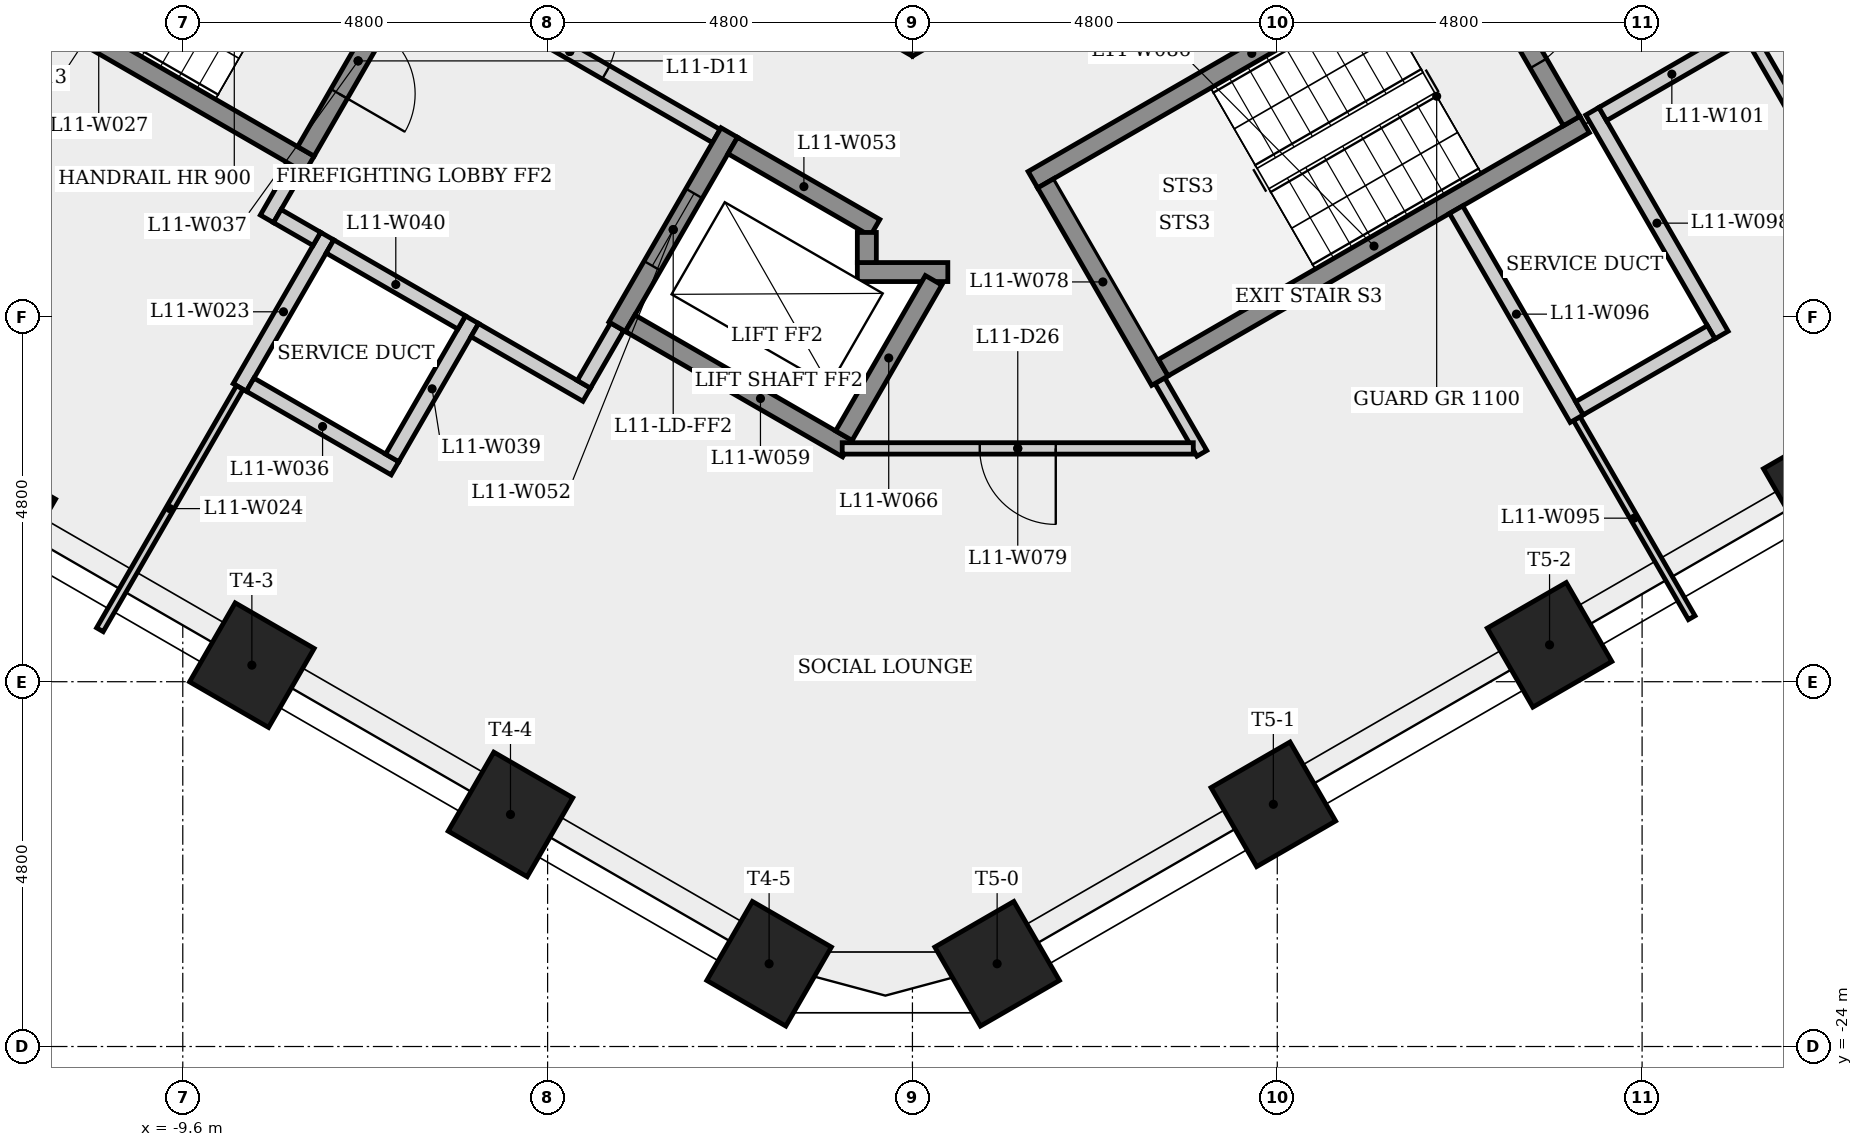
"""IFC4 building model, lengths in metres.
Left out: names, types, materials, properties, quantities, classifications, styles, units other than length and angle.
Written with IfcOpenShell. Run it as: python <this file> out.ifc"""

import sys

from ifc_helpers import new_model, si_unit, direction, frame, frame_2d, origin, origin_2d, place, context, subcontext, project, spatial, rectangle, extrude, element, fill, save


model = new_model("IFC4")
c1 = context("Model", 3, precision=1e-05, world=origin(), true_north=direction((0.0, 1.0)))
c2 = subcontext(c1, "Body", "Model", "MODEL_VIEW")
j1 = project(units=[si_unit("LENGTHUNIT", "METRE"), si_unit("PLANEANGLEUNIT", "RADIAN")], contexts=[c1])
p1 = place(None, origin())
s1 = spatial("IfcSite", under=j1, at=p1, CompositionType="ELEMENT")
p2 = place(p1, origin())
s2 = spatial("IfcBuilding", under=s1, at=p2, CompositionType="ELEMENT")
p3 = place(p2, frame((0.0, 0.0, 45.9)))
s3 = spatial("IfcBuildingStorey", under=s2, at=p3, CompositionType="ELEMENT", Elevation=45.9)
p4 = place(p3, frame((-9.3, -5.138, 0.0), z_axis=(0.0, 0.0, 1.0), x_axis=(0.866023993627, -0.500002442456, 0.0)))
e1 = element("IfcWall", 1, at=p4, inside=s3, PredefinedType="SHEAR", context=c2, shape_type="SweptSolid", body=[
    extrude(rectangle(XDim=10.97, YDim=0.8, at=frame_2d((5.485, 0.0))), origin(), (0.0, 0.0, 1.0), 3.4),
])
p5 = place(p4, frame((2.268, 0.0, 0.0)))
e2 = element("IfcOpeningElement", 2, at=p5, cuts=e1, PredefinedType="OPENING", context=c2, shape_type="SweptSolid", body=[
    extrude(rectangle(XDim=0.9, YDim=2.1, at=frame_2d((0.45, 1.05))), frame((0.0, 0.41, 0.0), z_axis=(0.0, -1.0, 0.0), x_axis=(1.0, 0.0, 0.0)), (0.0, 0.0, 1.0), 0.82),
])
p6 = place(p4, frame((8.903, 0.0, 0.0)))
e3 = element("IfcOpeningElement", 3, at=p6, cuts=e1, PredefinedType="OPENING", context=c2, shape_type="SweptSolid", body=[
    extrude(rectangle(XDim=0.9, YDim=2.1, at=frame_2d((0.45, 1.05))), frame((0.0, 0.41, 0.0), z_axis=(0.0, -1.0, 0.0), x_axis=(1.0, 0.0, 0.0)), (0.0, 0.0, 1.0), 0.82),
])
p7 = place(p3, frame((-0.2, -10.623, 0.0), z_axis=(0.0, 0.0, 1.0), x_axis=(0.866023993627, 0.500002442456, 0.0)))
e4 = element("IfcWall", 4, at=p7, inside=s3, PredefinedType="SHEAR", context=c2, shape_type="SweptSolid", body=[
    extrude(rectangle(XDim=10.97, YDim=0.8, at=frame_2d((5.485, 0.0))), origin(), (0.0, 0.0, 1.0), 3.4),
])
p8 = place(p7, frame((7.108, 0.0, 0.0)))
e5 = element("IfcOpeningElement", 5, at=p8, cuts=e4, PredefinedType="OPENING", context=c2, shape_type="SweptSolid", body=[
    extrude(rectangle(XDim=0.9, YDim=2.1, at=frame_2d((0.45, 1.05))), frame((0.0, 0.41, 0.0), z_axis=(0.0, -1.0, 0.0), x_axis=(1.0, 0.0, 0.0)), (0.0, 0.0, 1.0), 0.82),
])
for number, where, z_axis, x_axis in (
    (6, (-12.094, -17.018, 0.0), (0.0, 0.0, 1.0), (-0.5, -0.866, 0.0)),
    (7, (-8.691, -18.982, 0.0), (0.0, 0.0, 1.0), (-0.5, -0.866, 0.0)),
    (8, (-5.288, -20.947, 0.0), (0.0, 0.0, 1.0), (-0.5, -0.866, 0.0)),
    (9, (-1.886, -22.911, 0.0), (0.0, 0.0, 1.0), (-0.5, -0.866, 0.0)),
    (10, (1.114, -22.911, 0.0), (0.0, 0.0, 1.0), (0.5, -0.866, 0.0)),
    (11, (4.748, -20.813, 0.0), (0.0, 0.0, 1.0), (0.5, -0.866, 0.0)),
    (12, (8.382, -18.715, 0.0), (0.0, 0.0, 1.0), (0.5, -0.866, 0.0)),
    (13, (12.016, -16.617, 0.0), (0.0, 0.0, 1.0), (0.5, -0.866, 0.0)),
):
    element("IfcColumn", number, at=place(p3, frame(where, z_axis=z_axis, x_axis=x_axis)), inside=s3, PredefinedType="COLUMN", context=c2, shape_type="SweptSolid", body=[
        extrude(rectangle(XDim=1.2, YDim=1.2, at=origin_2d()), origin(), (0.0, 0.0, 1.0), 3.4),
    ])
p9 = place(p3, frame((-8.85, -15.329, 0.0), z_axis=(0.0, 0.0, 1.0), x_axis=(0.500077740698, 0.865980515519, 0.0)))
e14 = element("IfcWall", 14, at=p9, inside=s3, PredefinedType="PLUMBINGWALL", context=c2, shape_type="SweptSolid", body=[
    extrude(rectangle(XDim=2.3, YDim=0.2, at=frame_2d((1.15, 0.0))), origin(), (0.0, 0.0, 1.0), 3.05),
])
p10 = place(p3, frame((-8.85, -15.329, 0.0), z_axis=(0.0, 0.0, 1.0), x_axis=(-0.499955964762, -0.866050826049, 0.0)))
e15 = element("IfcWall", 15, at=p10, inside=s3, PredefinedType="PARTITIONING", context=c2, shape_type="SweptSolid", body=[
    extrude(rectangle(XDim=3.68, YDim=0.1, at=frame_2d((1.84, 0.0))), origin(), (0.0, 0.0, 1.0), 3.05),
])
p11 = place(p3, frame((-8.493, -13.11, 0.0), z_axis=(0.0, 0.0, 1.0), x_axis=(0.500067724834, 0.865986299303, 0.0)))
e16 = element("IfcWall", 16, at=p11, inside=s3, PredefinedType="PARTITIONING", context=c2, shape_type="SweptSolid", body=[
    extrude(rectangle(XDim=0.775, YDim=0.2, at=frame_2d((0.388, 0.0))), origin(), (0.0, 0.0, 1.0), 3.05),
])
p12 = place(p3, frame((-7.935, -12.393, 0.0), z_axis=(0.0, 0.0, 1.0), x_axis=(-0.866025499775, 0.499999833739, 0.0)))
e17 = element("IfcWall", 17, at=p12, inside=s3, PredefinedType="SHEAR", context=c2, shape_type="SweptSolid", body=[
    extrude(rectangle(XDim=6.4, YDim=0.25, at=frame_2d((3.2, 0.0))), origin(), (0.0, 0.0, 1.0), 3.05),
])
p13 = place(p3, frame((-7.836, -13.373, 0.0), z_axis=(0.0, 0.0, 1.0), x_axis=(-0.866232998003, 0.499640263761, 0.0)))
e18 = element("IfcWall", 18, at=p13, inside=s3, PredefinedType="PARTITIONING", context=c2, shape_type="SweptSolid", body=[
    extrude(rectangle(XDim=0.6, YDim=0.2, at=frame_2d((0.3, 0.0))), origin(), (0.0, 0.0, 1.0), 3.05),
])
p14 = place(p3, frame((-6.808, -16.392, 0.0), z_axis=(0.0, 0.0, 1.0), x_axis=(-0.866008176907, 0.50002983664, 0.0)))
e19 = element("IfcWall", 19, at=p14, inside=s3, PredefinedType="PLUMBINGWALL", context=c2, shape_type="SweptSolid", body=[
    extrude(rectangle(XDim=2.2, YDim=0.2, at=frame_2d((1.1, 0.0))), origin(), (0.0, 0.0, 1.0), 3.05),
])
p15 = place(p3, frame((-6.605, -9.841, 0.0), z_axis=(0.0, 0.0, 1.0), x_axis=(-0.499996545922, -0.866027397988, 0.0)))
e20 = element("IfcWall", 20, at=p15, inside=s3, PredefinedType="SHEAR", context=c2, shape_type="SweptSolid", body=[
    extrude(rectangle(XDim=2.75, YDim=0.25, at=frame_2d((1.375, 0.0))), origin(), (0.0, 0.0, 1.0), 3.05),
])
p16 = place(p15, frame((0.875, 0.0, 0.0)))
e21 = element("IfcOpeningElement", 21, at=p16, cuts=e20, PredefinedType="OPENING", context=c2, shape_type="SweptSolid", body=[
    extrude(rectangle(XDim=1.0, YDim=2.1, at=frame_2d((0.5, 1.05))), frame((0.0, 0.135, 0.0), z_axis=(0.0, -1.0, 0.0), x_axis=(1.0, 0.0, 0.0)), (0.0, 0.0, 1.0), 0.27),
])
p17 = place(p3, frame((-6.435, -9.795, 0.0), z_axis=(0.0, 0.0, 1.0), x_axis=(0.866012907634, -0.500021643343, 0.0)))
e22 = element("IfcWall", 22, at=p17, inside=s3, PredefinedType="PARTITIONING", context=c2, shape_type="SweptSolid", body=[
    extrude(rectangle(XDim=4.45, YDim=0.2, at=frame_2d((2.225, 0.0))), origin(), (0.0, 0.0, 1.0), 3.05),
])
p18 = place(p17, frame((1.675, 0.0, 0.0)))
e23 = element("IfcOpeningElement", 23, at=p18, cuts=e22, PredefinedType="OPENING", context=c2, shape_type="SweptSolid", body=[
    extrude(rectangle(XDim=1.1, YDim=2.1, at=frame_2d((0.55, 1.05))), frame((0.0, 0.11, 0.0), z_axis=(0.0, -1.0, 0.0), x_axis=(1.0, 0.0, 0.0)), (0.0, 0.0, 1.0), 0.22),
])
p19 = place(p3, frame((-5.795, -14.437, 0.0), z_axis=(0.0, 0.0, 1.0), x_axis=(-0.500027713859, -0.866009402589, 0.0)))
e24 = element("IfcWall", 24, at=p19, inside=s3, PredefinedType="PLUMBINGWALL", context=c2, shape_type="SweptSolid", body=[
    extrude(rectangle(XDim=2.1, YDim=0.2, at=frame_2d((1.05, 0.0))), origin(), (0.0, 0.0, 1.0), 3.05),
])
p20 = place(p3, frame((-5.931, -14.473, 0.0), z_axis=(0.0, 0.0, 1.0), x_axis=(-0.866041268327, 0.499972520799, 0.0)))
e25 = element("IfcWall", 25, at=p20, inside=s3, PredefinedType="PLUMBINGWALL", context=c2, shape_type="SweptSolid", body=[
    extrude(rectangle(XDim=2.0, YDim=0.2, at=frame_2d((1.0, 0.0))), origin(), (0.0, 0.0, 1.0), 3.05),
])
p21 = place(p3, frame((-4.286, -15.423, 0.0), z_axis=(0.0, 0.0, 1.0), x_axis=(-0.866025371046, 0.500000056704, 0.0)))
e26 = element("IfcWall", 26, at=p21, inside=s3, PredefinedType="PARTITIONING", context=c2, shape_type="SweptSolid", body=[
    extrude(rectangle(XDim=1.7, YDim=0.2, at=frame_2d((0.85, 0.0))), origin(), (0.0, 0.0, 1.0), 3.05),
])
p22 = place(p3, frame((-3.885, -14.529, 0.0), z_axis=(0.0, 0.0, 1.0), x_axis=(-0.499859285417, -0.866106630146, 0.0)))
e27 = element("IfcWall", 27, at=p22, inside=s3, PredefinedType="PARTITIONING", context=c2, shape_type="SweptSolid", body=[
    extrude(rectangle(XDim=0.875, YDim=0.2, at=frame_2d((0.438, 0.0))), origin(), (0.0, 0.0, 1.0), 3.05),
])
p23 = place(p3, frame((-2.41, -11.974, 0.0), z_axis=(0.0, 0.0, 1.0), x_axis=(-0.500001826776, -0.866024349092, 0.0)))
e28 = element("IfcWall", 28, at=p23, inside=s3, PredefinedType="SHEAR", context=c2, shape_type="SweptSolid", body=[
    extrude(rectangle(XDim=2.95, YDim=0.25, at=frame_2d((1.475, 0.0))), origin(), (0.0, 0.0, 1.0), 3.05),
])
p24 = place(p23, frame((0.925, 0.0, 0.0)))
e29 = element("IfcOpeningElement", 29, at=p24, cuts=e28, PredefinedType="OPENING", context=c2, shape_type="SweptSolid", body=[
    extrude(rectangle(XDim=1.1, YDim=2.1, at=frame_2d((0.55, 1.05))), frame((0.0, 0.135, 0.0), z_axis=(0.0, -1.0, 0.0), x_axis=(1.0, 0.0, 0.0)), (0.0, 0.0, 1.0), 0.27),
])
p25 = place(p3, frame((-2.364, -12.145, 0.0), z_axis=(0.0, 0.0, 1.0), x_axis=(0.86603892542, -0.499976579108, 0.0)))
e30 = element("IfcWall", 30, at=p25, inside=s3, PredefinedType="SHEAR", context=c2, shape_type="SweptSolid", body=[
    extrude(rectangle(XDim=2.162, YDim=0.25, at=frame_2d((1.081, 0.0))), origin(), (0.0, 0.0, 1.0), 3.05),
])
p26 = place(p3, frame((-0.856, -16.133, 0.0), z_axis=(0.0, 0.0, 1.0), x_axis=(-0.866021716278, 0.500006386895, 0.0)))
e31 = element("IfcWall", 31, at=p26, inside=s3, PredefinedType="SHEAR", context=c2, shape_type="SweptSolid", body=[
    extrude(rectangle(XDim=3.3, YDim=0.25, at=frame_2d((1.65, 0.0))), origin(), (0.0, 0.0, 1.0), 3.05),
])
p27 = place(p3, frame((-0.725, -13.81, 0.0), z_axis=(0.0, 0.0, 1.0), x_axis=(1.0, 0.0, 0.0)))
e32 = element("IfcWall", 32, at=p27, inside=s3, PredefinedType="SHEAR", context=c2, shape_type="SweptSolid", body=[
    extrude(rectangle(XDim=1.191, YDim=0.25, at=frame_2d((0.595, 0.0))), origin(), (0.0, 0.0, 1.0), 3.05),
])
p28 = place(p3, frame((-0.6, -13.289, 0.0), z_axis=(0.0, 0.0, 1.0), x_axis=(0.0, -1.0, 0.0)))
e33 = element("IfcWall", 33, at=p28, inside=s3, PredefinedType="SHEAR", context=c2, shape_type="SweptSolid", body=[
    extrude(rectangle(XDim=0.396, YDim=0.25, at=frame_2d((0.198, 0.0))), origin(), (0.0, 0.0, 1.0), 3.4),
])
p29 = place(p3, frame((0.278, -13.918, 0.0), z_axis=(0.0, 0.0, 1.0), x_axis=(-0.49998806882, -0.866032292145, 0.0)))
e34 = element("IfcWall", 34, at=p29, inside=s3, PredefinedType="SHEAR", context=c2, shape_type="SweptSolid", body=[
    extrude(rectangle(XDim=2.36, YDim=0.25, at=frame_2d((1.18, 0.0))), origin(), (0.0, 0.0, 1.0), 3.4),
])
p30 = place(p3, frame((1.585, -12.595, 0.0), z_axis=(0.0, 0.0, 1.0), x_axis=(0.866036417653, 0.499980922934, 0.0)))
e35 = element("IfcWall", 35, at=p30, inside=s3, PredefinedType="SHEAR", context=c2, shape_type="SweptSolid", body=[
    extrude(rectangle(XDim=6.65, YDim=0.25, at=frame_2d((3.325, 0.0))), origin(), (0.0, 0.0, 1.0), 3.05),
])
p31 = place(p30, frame((5.275, 0.0, 0.0)))
e36 = element("IfcOpeningElement", 36, at=p31, cuts=e35, PredefinedType="OPENING", context=c2, shape_type="SweptSolid", body=[
    extrude(rectangle(XDim=1.0, YDim=2.1, at=frame_2d((0.5, 1.05))), frame((0.0, 0.135, 0.0), z_axis=(0.0, -1.0, 0.0), x_axis=(1.0, 0.0, 0.0)), (0.0, 0.0, 1.0), 0.27),
])
p32 = place(p3, frame((3.256, -15.239, 0.0), z_axis=(0.0, 0.0, 1.0), x_axis=(0.499990325971, -0.866030989016, 0.0)))
e37 = element("IfcWall", 37, at=p32, inside=s3, PredefinedType="PARTITIONING", context=c2, shape_type="SweptSolid", body=[
    extrude(rectangle(XDim=1.104, YDim=0.15, at=frame_2d((0.552, 0.0))), origin(), (0.0, 0.0, 1.0), 3.05),
])
p33 = place(p3, frame((3.256, -15.239, 0.0), z_axis=(0.0, 0.0, 1.0), x_axis=(-0.50002537861, 0.866010750942, 0.0)))
e38 = element("IfcWall", 38, at=p33, inside=s3, PredefinedType="SHEAR", context=c2, shape_type="SweptSolid", body=[
    extrude(rectangle(XDim=3.0, YDim=0.25, at=frame_2d((1.5, 0.0))), origin(), (0.0, 0.0, 1.0), 3.05),
])
p34 = place(p3, frame((3.695, -16.13, 0.0), z_axis=(0.0, 0.0, 1.0), x_axis=(-1.0, 0.0, 0.0)))
e39 = element("IfcWall", 39, at=p34, inside=s3, PredefinedType="PARTITIONING", context=c2, shape_type="SweptSolid", body=[
    extrude(rectangle(XDim=4.619, YDim=0.15, at=frame_2d((2.31, 0.0))), origin(), (0.0, 0.0, 1.0), 3.05),
])
p35 = place(p34, frame((1.81, 0.0, 0.0)))
e40 = element("IfcOpeningElement", 40, at=p35, cuts=e39, PredefinedType="OPENING", context=c2, shape_type="SweptSolid", body=[
    extrude(rectangle(XDim=1.0, YDim=2.1, at=frame_2d((0.5, 1.05))), frame((0.0, 0.085, 0.0), z_axis=(0.0, -1.0, 0.0), x_axis=(1.0, 0.0, 0.0)), (0.0, 0.0, 1.0), 0.17),
])
p36 = place(p3, frame((3.301, -15.068, 0.0), z_axis=(0.0, 0.0, 1.0), x_axis=(0.866035036182, 0.499983315828, 0.0)))
e41 = element("IfcWall", 41, at=p36, inside=s3, PredefinedType="SHEAR", context=c2, shape_type="SweptSolid", body=[
    extrude(rectangle(XDim=6.4, YDim=0.25, at=frame_2d((3.2, 0.0))), origin(), (0.0, 0.0, 1.0), 3.05),
])
p37 = place(p3, frame((7.298, -9.441, 0.0), z_axis=(0.0, 0.0, 1.0), x_axis=(0.500034990121, -0.866005201286, 0.0)))
e42 = element("IfcWall", 42, at=p37, inside=s3, PredefinedType="SHEAR", context=c2, shape_type="SweptSolid", body=[
    extrude(rectangle(XDim=2.75, YDim=0.25, at=frame_2d((1.375, 0.0))), origin(), (0.0, 0.0, 1.0), 3.05),
])
p38 = place(p37, frame((0.875, 0.0, 0.0)))
e43 = element("IfcOpeningElement", 43, at=p38, cuts=e42, PredefinedType="OPENING", context=c2, shape_type="SweptSolid", body=[
    extrude(rectangle(XDim=1.0, YDim=2.1, at=frame_2d((0.5, 1.05))), frame((0.0, 0.135, 0.0), z_axis=(0.0, -1.0, 0.0), x_axis=(1.0, 0.0, 0.0)), (0.0, 0.0, 1.0), 0.27),
])
p39 = place(p3, frame((8.74, -15.738, 0.0), z_axis=(0.0, 0.0, 1.0), x_axis=(0.500001913541, -0.866024298998, 0.0)))
e44 = element("IfcWall", 44, at=p39, inside=s3, PredefinedType="PARTITIONING", context=c2, shape_type="SweptSolid", body=[
    extrude(rectangle(XDim=3.025, YDim=0.1, at=frame_2d((1.512, 0.0))), origin(), (0.0, 0.0, 1.0), 3.05),
])
p40 = place(p3, frame((8.74, -15.739, 0.0), z_axis=(0.0, 0.0, 1.0), x_axis=(-0.500017526161, 0.866015284814, 0.0)))
e45 = element("IfcWall", 45, at=p40, inside=s3, PredefinedType="PLUMBINGWALL", context=c2, shape_type="SweptSolid", body=[
    extrude(rectangle(XDim=3.175, YDim=0.2, at=frame_2d((1.588, 0.0))), origin(), (0.0, 0.0, 1.0), 3.05),
])
p41 = place(p3, frame((8.945, -11.694, 0.0), z_axis=(0.0, 0.0, 1.0), x_axis=(0.500062241894, -0.865989465428, 0.0)))
e46 = element("IfcWall", 46, at=p41, inside=s3, PredefinedType="PLUMBINGWALL", context=c2, shape_type="SweptSolid", body=[
    extrude(rectangle(XDim=3.4, YDim=0.2, at=frame_2d((1.7, 0.0))), origin(), (0.0, 0.0, 1.0), 3.05),
])
p42 = place(p3, frame((10.509, -14.602, 0.0), z_axis=(0.0, 0.0, 1.0), x_axis=(-0.866010750942, -0.50002537861, 0.0)))
e47 = element("IfcWall", 47, at=p42, inside=s3, PredefinedType="PLUMBINGWALL", context=c2, shape_type="SweptSolid", body=[
    extrude(rectangle(XDim=2.0, YDim=0.2, at=frame_2d((1.0, 0.0))), origin(), (0.0, 0.0, 1.0), 3.05),
])
p43 = place(p3, frame((10.901, -10.681, 0.0), z_axis=(0.0, 0.0, 1.0), x_axis=(-0.866009402589, -0.500027713859, 0.0)))
e48 = element("IfcWall", 48, at=p43, inside=s3, PredefinedType="PARTITIONING", context=c2, shape_type="SweptSolid", body=[
    extrude(rectangle(XDim=2.1, YDim=0.2, at=frame_2d((1.05, 0.0))), origin(), (0.0, 0.0, 1.0), 3.05),
])
p44 = place(p3, frame((12.468, -13.195, 0.0), z_axis=(0.0, 0.0, 1.0), x_axis=(-0.499956322556, 0.8660506195, 0.0)))
e49 = element("IfcWall", 49, at=p44, inside=s3, PredefinedType="PARTITIONING", context=c2, shape_type="SweptSolid", body=[
    extrude(rectangle(XDim=2.862, YDim=0.15, at=frame_2d((1.431, 0.0))), origin(), (0.0, 0.0, 1.0), 3.05),
])
p45 = place(p16, origin())
e50 = element("IfcDoor", 50, at=p45, inside=s3, OperationType="SINGLE_SWING_RIGHT", PredefinedType="DOOR", context=c2, shape_type="SweptSolid", body=[
    extrude(rectangle(XDim=1.0, YDim=2.1, at=frame_2d((0.5, 1.05))), frame((0.0, 0.025, 0.0), z_axis=(0.0, -1.0, 0.0), x_axis=(1.0, 0.0, 0.0)), (0.0, 0.0, 1.0), 0.05),
])
fill(e21, e50)
p46 = place(p18, origin())
e51 = element("IfcDoor", 51, at=p46, inside=s3, OperationType="SINGLE_SWING_LEFT", PredefinedType="DOOR", context=c2, shape_type="SweptSolid", body=[
    extrude(rectangle(XDim=1.1, YDim=2.1, at=frame_2d((0.55, 1.05))), frame((0.0, 0.025, 0.0), z_axis=(0.0, -1.0, 0.0), x_axis=(1.0, 0.0, 0.0)), (0.0, 0.0, 1.0), 0.05),
])
fill(e23, e51)
p47 = place(p24, origin())
e52 = element("IfcDoor", 52, at=p47, inside=s3, OperationType="SLIDING_TO_LEFT", PredefinedType="DOOR", context=c2, shape_type="SweptSolid", body=[
    extrude(rectangle(XDim=1.1, YDim=2.1, at=frame_2d((0.55, 1.05))), frame((0.0, 0.025, 0.0), z_axis=(0.0, -1.0, 0.0), x_axis=(1.0, 0.0, 0.0)), (0.0, 0.0, 1.0), 0.05),
])
fill(e29, e52)
p48 = place(p38, origin())
e53 = element("IfcDoor", 53, at=p48, inside=s3, OperationType="SINGLE_SWING_LEFT", PredefinedType="DOOR", context=c2, shape_type="SweptSolid", body=[
    extrude(rectangle(XDim=1.0, YDim=2.1, at=frame_2d((0.5, 1.05))), frame((0.0, 0.025, 0.0), z_axis=(0.0, -1.0, 0.0), x_axis=(1.0, 0.0, 0.0)), (0.0, 0.0, 1.0), 0.05),
])
fill(e43, e53)
p49 = place(p35, origin())
e54 = element("IfcDoor", 54, at=p49, inside=s3, OperationType="SINGLE_SWING_LEFT", PredefinedType="DOOR", context=c2, shape_type="SweptSolid", body=[
    extrude(rectangle(XDim=1.0, YDim=2.1, at=frame_2d((0.5, 1.05))), frame((0.0, 0.025, 0.0), z_axis=(0.0, -1.0, 0.0), x_axis=(1.0, 0.0, 0.0)), (0.0, 0.0, 1.0), 0.05),
])
fill(e40, e54)
save(model, sys.argv[1])
